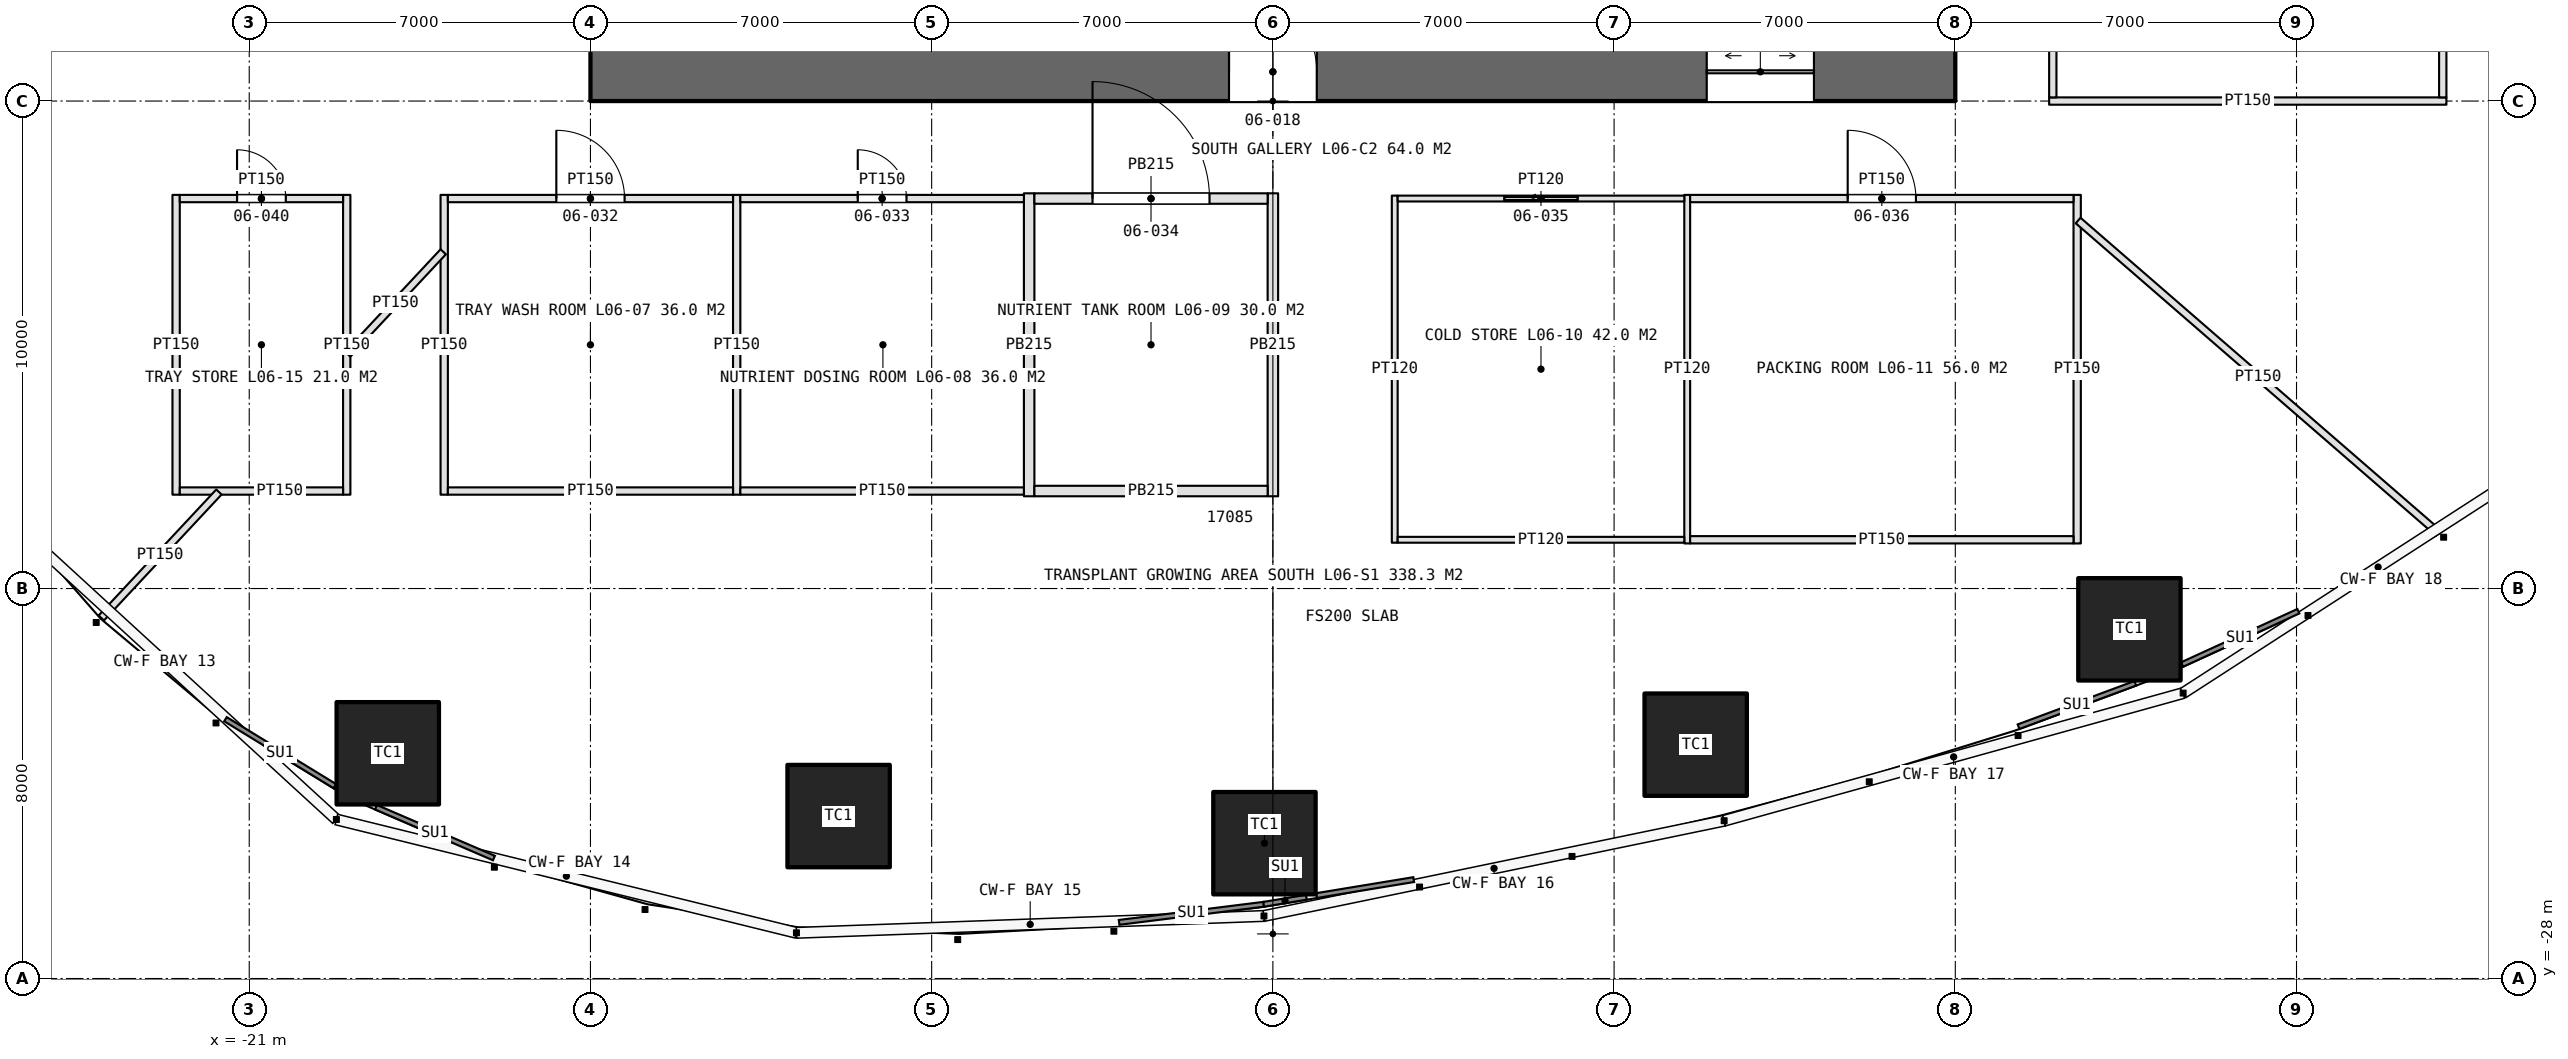
"""IFC4 building model, lengths in metres.
Left out: names, types, materials, properties, quantities, classifications, styles, units other than length and angle.
Written with IfcOpenShell. Run it as: python <this file> out.ifc"""

import sys

from ifc_helpers import new_model, si_unit, direction, frame, frame_2d, origin, origin_2d, place, context, subcontext, project, spatial, rectangle, extrude, element, fill, save


model = new_model("IFC4")
c1 = context("Model", 3, precision=1e-05, world=origin(), true_north=direction((0.0, 1.0)))
c2 = subcontext(c1, "Body", "Model", "MODEL_VIEW")
j1 = project(units=[si_unit("LENGTHUNIT", "METRE"), si_unit("PLANEANGLEUNIT", "RADIAN")], contexts=[c1])
p1 = place(None, origin())
s1 = spatial("IfcSite", under=j1, at=p1, CompositionType="ELEMENT")
p2 = place(p1, origin())
s2 = spatial("IfcBuilding", under=s1, at=p2, CompositionType="ELEMENT")
p3 = place(p2, frame((0.0, 0.0, 30.0)))
s3 = spatial("IfcBuildingStorey", under=s2, at=p3, CompositionType="ELEMENT", Elevation=30.0)
p4 = place(p3, frame((-14.0, -9.4, 0.0), z_axis=(0.0, 0.0, 1.0), x_axis=(1.0, 0.0, 0.0)))
e1 = element("IfcWall", 1, at=p4, inside=s3, PredefinedType="SHEAR", context=c2, shape_type="SweptSolid", body=[
    extrude(rectangle(XDim=28.0, YDim=1.2, at=frame_2d((14.0, 0.0))), origin(), (0.0, 0.0, 1.0), 5.0),
])
p5 = place(p4, frame((13.1, 0.0, 0.0)))
e2 = element("IfcOpeningElement", 2, at=p5, cuts=e1, PredefinedType="OPENING", context=c2, shape_type="SweptSolid", body=[
    extrude(rectangle(XDim=1.8, YDim=2.4, at=frame_2d((0.9, 1.2))), frame((0.0, 0.61, 0.0), z_axis=(0.0, -1.0, 0.0), x_axis=(1.0, 0.0, 0.0)), (0.0, 0.0, 1.0), 1.22),
])
p6 = place(p4, frame((22.9, 0.0, 0.0)))
e3 = element("IfcOpeningElement", 3, at=p6, cuts=e1, PredefinedType="OPENING", context=c2, shape_type="SweptSolid", body=[
    extrude(rectangle(XDim=2.2, YDim=2.7, at=frame_2d((1.1, 1.35))), frame((0.0, 0.61, 0.0), z_axis=(0.0, -1.0, 0.0), x_axis=(1.0, 0.0, 0.0)), (0.0, 0.0, 1.0), 1.22),
])
for number, where, z_axis, x_axis in (
    (4, (-18.158, -23.38, 0.0), (0.0, 0.0, 1.0), (1.0, 0.0, 0.0)),
    (5, (-8.909, -24.668, 0.0), (0.0, 0.0, 1.0), (1.0, 0.0, 0.0)),
    (6, (-0.173, -25.224, 0.0), (0.0, 0.0, 1.0), (1.0, 0.0, 0.0)),
    (7, (8.674, -23.203, 0.0), (0.0, 0.0, 1.0), (1.0, 0.0, 0.0)),
    (8, (17.572, -20.837, 0.0), (0.0, 0.0, 1.0), (1.0, 0.0, 0.0)),
):
    element("IfcColumn", number, at=place(p3, frame(where, z_axis=z_axis, x_axis=x_axis)), inside=s3, PredefinedType="COLUMN", context=c2, shape_type="SweptSolid", body=[
        extrude(rectangle(XDim=2.1, YDim=2.1, at=origin_2d()), origin(), (0.0, 0.0, 1.0), 5.0),
    ])
p7 = place(p3, frame((15.925, -10.0, 0.0), z_axis=(0.0, 0.0, 1.0), x_axis=(1.0, 0.0, 0.0)))
e9 = element("IfcWall", 9, at=p7, inside=s3, PredefinedType="PARTITIONING", context=c2, shape_type="SweptSolid", body=[
    extrude(rectangle(XDim=8.15, YDim=0.15, at=frame_2d((4.075, 0.0))), origin(), (0.0, 0.0, 1.0), 3.6),
])
p8 = place(p3, frame((16.0, -9.925, 0.0), z_axis=(0.0, 0.0, 1.0), x_axis=(0.0, 1.0, 0.0)))
e10 = element("IfcWall", 10, at=p8, inside=s3, PredefinedType="PARTITIONING", context=c2, shape_type="SweptSolid", body=[
    extrude(rectangle(XDim=9.85, YDim=0.15, at=frame_2d((4.925, 0.0))), origin(), (0.0, 0.0, 1.0), 3.6),
])
p9 = place(p8, frame((4.225, 0.0, 0.0)))
e11 = element("IfcOpeningElement", 11, at=p9, cuts=e10, PredefinedType="OPENING", context=c2, shape_type="SweptSolid", body=[
    extrude(rectangle(XDim=1.4, YDim=2.4, at=frame_2d((0.7, 1.2))), frame((0.0, 0.085, 0.0), z_axis=(0.0, -1.0, 0.0), x_axis=(1.0, 0.0, 0.0)), (0.0, 0.0, 1.0), 0.17),
])
p10 = place(p3, frame((24.0, -9.925, 0.0), z_axis=(0.0, 0.0, 1.0), x_axis=(0.0, 1.0, 0.0)))
e12 = element("IfcWall", 12, at=p10, inside=s3, PredefinedType="PARTITIONING", context=c2, shape_type="SweptSolid", body=[
    extrude(rectangle(XDim=9.85, YDim=0.15, at=frame_2d((4.925, 0.0))), origin(), (0.0, 0.0, 1.0), 3.6),
])
for number, where, z_axis, x_axis in (
    (13, (-17.0, -11.925, 0.0), (0.0, 0.0, 1.0), (0.0, -1.0, 0.0)),
    (14, (-11.0, -11.925, 0.0), (0.0, 0.0, 1.0), (0.0, -1.0, 0.0)),
):
    element("IfcWall", number, at=place(p3, frame(where, z_axis=z_axis, x_axis=x_axis)), inside=s3, PredefinedType="PARTITIONING", context=c2, shape_type="SweptSolid", body=[
        extrude(rectangle(XDim=6.15, YDim=0.15, at=frame_2d((3.075, 0.0))), origin(), (0.0, 0.0, 1.0), 3.6),
    ])
for number, where, z_axis, x_axis in (
    (15, (-5.0, -11.893, 0.0), (0.0, 0.0, 1.0), (0.0, -1.0, 0.0)),
    (16, (0.0, -11.893, 0.0), (0.0, 0.0, 1.0), (0.0, -1.0, 0.0)),
):
    element("IfcWall", number, at=place(p3, frame(where, z_axis=z_axis, x_axis=x_axis)), inside=s3, PredefinedType="PARTITIONING", context=c2, shape_type="SweptSolid", body=[
        extrude(rectangle(XDim=6.215, YDim=0.215, at=frame_2d((3.107, 0.0))), origin(), (0.0, 0.0, 1.0), 3.6),
    ])
p11 = place(p3, frame((-16.925, -12.0, 0.0), z_axis=(0.0, 0.0, 1.0), x_axis=(1.0, 0.0, 0.0)))
e17 = element("IfcWall", 17, at=p11, inside=s3, PredefinedType="PARTITIONING", context=c2, shape_type="SweptSolid", body=[
    extrude(rectangle(XDim=5.85, YDim=0.15, at=frame_2d((2.925, 0.0))), origin(), (0.0, 0.0, 1.0), 3.6),
])
p12 = place(p11, frame((2.225, 0.0, 0.0)))
e18 = element("IfcOpeningElement", 18, at=p12, cuts=e17, PredefinedType="OPENING", context=c2, shape_type="SweptSolid", body=[
    extrude(rectangle(XDim=1.4, YDim=2.4, at=frame_2d((0.7, 1.2))), frame((0.0, 0.085, 0.0), z_axis=(0.0, -1.0, 0.0), x_axis=(1.0, 0.0, 0.0)), (0.0, 0.0, 1.0), 0.17),
])
p13 = place(p3, frame((-16.925, -18.0, 0.0), z_axis=(0.0, 0.0, 1.0), x_axis=(1.0, 0.0, 0.0)))
e19 = element("IfcWall", 19, at=p13, inside=s3, PredefinedType="PARTITIONING", context=c2, shape_type="SweptSolid", body=[
    extrude(rectangle(XDim=5.85, YDim=0.15, at=frame_2d((2.925, 0.0))), origin(), (0.0, 0.0, 1.0), 3.6),
])
p14 = place(p3, frame((-10.925, -12.0, 0.0), z_axis=(0.0, 0.0, 1.0), x_axis=(1.0, 0.0, 0.0)))
e20 = element("IfcWall", 20, at=p14, inside=s3, PredefinedType="PARTITIONING", context=c2, shape_type="SweptSolid", body=[
    extrude(rectangle(XDim=5.818, YDim=0.15, at=frame_2d((2.909, 0.0))), origin(), (0.0, 0.0, 1.0), 3.6),
])
p15 = place(p14, frame((2.409, 0.0, 0.0)))
e21 = element("IfcOpeningElement", 21, at=p15, cuts=e20, PredefinedType="OPENING", context=c2, shape_type="SweptSolid", body=[
    extrude(rectangle(XDim=1.0, YDim=2.2, at=frame_2d((0.5, 1.1))), frame((0.0, 0.085, 0.0), z_axis=(0.0, -1.0, 0.0), x_axis=(1.0, 0.0, 0.0)), (0.0, 0.0, 1.0), 0.17),
])
p16 = place(p3, frame((-10.925, -18.0, 0.0), z_axis=(0.0, 0.0, 1.0), x_axis=(1.0, 0.0, 0.0)))
e22 = element("IfcWall", 22, at=p16, inside=s3, PredefinedType="PARTITIONING", context=c2, shape_type="SweptSolid", body=[
    extrude(rectangle(XDim=5.818, YDim=0.15, at=frame_2d((2.909, 0.0))), origin(), (0.0, 0.0, 1.0), 3.6),
])
p17 = place(p3, frame((-4.893, -12.0, 0.0), z_axis=(0.0, 0.0, 1.0), x_axis=(1.0, 0.0, 0.0)))
e23 = element("IfcWall", 23, at=p17, inside=s3, PredefinedType="PARTITIONING", context=c2, shape_type="SweptSolid", body=[
    extrude(rectangle(XDim=4.785, YDim=0.215, at=frame_2d((2.393, 0.0))), origin(), (0.0, 0.0, 1.0), 3.6),
])
p18 = place(p17, frame((1.192, 0.0, 0.0)))
e24 = element("IfcOpeningElement", 24, at=p18, cuts=e23, PredefinedType="OPENING", context=c2, shape_type="SweptSolid", body=[
    extrude(rectangle(XDim=2.4, YDim=2.4, at=frame_2d((1.2, 1.2))), frame((0.0, 0.118, 0.0), z_axis=(0.0, -1.0, 0.0), x_axis=(1.0, 0.0, 0.0)), (0.0, 0.0, 1.0), 0.235),
])
p19 = place(p3, frame((-4.893, -18.0, 0.0), z_axis=(0.0, 0.0, 1.0), x_axis=(1.0, 0.0, 0.0)))
e25 = element("IfcWall", 25, at=p19, inside=s3, PredefinedType="PARTITIONING", context=c2, shape_type="SweptSolid", body=[
    extrude(rectangle(XDim=4.785, YDim=0.215, at=frame_2d((2.393, 0.0))), origin(), (0.0, 0.0, 1.0), 3.6),
])
p20 = place(p3, frame((2.5, -11.94, 0.0), z_axis=(0.0, 0.0, 1.0), x_axis=(0.0, -1.0, 0.0)))
e26 = element("IfcWall", 26, at=p20, inside=s3, PredefinedType="PARTITIONING", context=c2, shape_type="SweptSolid", body=[
    extrude(rectangle(XDim=7.12, YDim=0.12, at=frame_2d((3.56, 0.0))), origin(), (0.0, 0.0, 1.0), 3.6),
])
p21 = place(p3, frame((8.5, -11.925, 0.0), z_axis=(0.0, 0.0, 1.0), x_axis=(0.0, -1.0, 0.0)))
e27 = element("IfcWall", 27, at=p21, inside=s3, PredefinedType="PARTITIONING", context=c2, shape_type="SweptSolid", body=[
    extrude(rectangle(XDim=7.15, YDim=0.12, at=frame_2d((3.575, 0.0))), origin(), (0.0, 0.0, 1.0), 3.6),
])
p22 = place(p3, frame((16.5, -11.925, 0.0), z_axis=(0.0, 0.0, 1.0), x_axis=(0.0, -1.0, 0.0)))
e28 = element("IfcWall", 28, at=p22, inside=s3, PredefinedType="PARTITIONING", context=c2, shape_type="SweptSolid", body=[
    extrude(rectangle(XDim=7.15, YDim=0.15, at=frame_2d((3.575, 0.0))), origin(), (0.0, 0.0, 1.0), 3.6),
])
p23 = place(p3, frame((2.56, -12.0, 0.0), z_axis=(0.0, 0.0, 1.0), x_axis=(1.0, 0.0, 0.0)))
e29 = element("IfcWall", 29, at=p23, inside=s3, PredefinedType="PARTITIONING", context=c2, shape_type="SweptSolid", body=[
    extrude(rectangle(XDim=5.88, YDim=0.12, at=frame_2d((2.94, 0.0))), origin(), (0.0, 0.0, 1.0), 3.6),
])
p24 = place(p23, frame((2.19, 0.0, 0.0)))
e30 = element("IfcOpeningElement", 30, at=p24, cuts=e29, PredefinedType="OPENING", context=c2, shape_type="SweptSolid", body=[
    extrude(rectangle(XDim=1.5, YDim=2.5, at=frame_2d((0.75, 1.25))), frame((0.0, 0.07, 0.0), z_axis=(0.0, -1.0, 0.0), x_axis=(1.0, 0.0, 0.0)), (0.0, 0.0, 1.0), 0.14),
])
p25 = place(p3, frame((2.56, -19.0, 0.0), z_axis=(0.0, 0.0, 1.0), x_axis=(1.0, 0.0, 0.0)))
e31 = element("IfcWall", 31, at=p25, inside=s3, PredefinedType="PARTITIONING", context=c2, shape_type="SweptSolid", body=[
    extrude(rectangle(XDim=5.88, YDim=0.12, at=frame_2d((2.94, 0.0))), origin(), (0.0, 0.0, 1.0), 3.6),
])
p26 = place(p3, frame((8.56, -12.0, 0.0), z_axis=(0.0, 0.0, 1.0), x_axis=(1.0, 0.0, 0.0)))
e32 = element("IfcWall", 32, at=p26, inside=s3, PredefinedType="PARTITIONING", context=c2, shape_type="SweptSolid", body=[
    extrude(rectangle(XDim=7.865, YDim=0.15, at=frame_2d((3.933, 0.0))), origin(), (0.0, 0.0, 1.0), 3.6),
])
p27 = place(p26, frame((3.232, 0.0, 0.0)))
e33 = element("IfcOpeningElement", 33, at=p27, cuts=e32, PredefinedType="OPENING", context=c2, shape_type="SweptSolid", body=[
    extrude(rectangle(XDim=1.4, YDim=2.4, at=frame_2d((0.7, 1.2))), frame((0.0, 0.085, 0.0), z_axis=(0.0, -1.0, 0.0), x_axis=(1.0, 0.0, 0.0)), (0.0, 0.0, 1.0), 0.17),
])
p28 = place(p3, frame((8.56, -19.0, 0.0), z_axis=(0.0, 0.0, 1.0), x_axis=(1.0, 0.0, 0.0)))
e34 = element("IfcWall", 34, at=p28, inside=s3, PredefinedType="PARTITIONING", context=c2, shape_type="SweptSolid", body=[
    extrude(rectangle(XDim=7.865, YDim=0.15, at=frame_2d((3.933, 0.0))), origin(), (0.0, 0.0, 1.0), 3.6),
])
for number, where, z_axis, x_axis in (
    (35, (-22.5, -11.925, 0.0), (0.0, 0.0, 1.0), (0.0, -1.0, 0.0)),
    (36, (-19.0, -11.925, 0.0), (0.0, 0.0, 1.0), (0.0, -1.0, 0.0)),
):
    element("IfcWall", number, at=place(p3, frame(where, z_axis=z_axis, x_axis=x_axis)), inside=s3, PredefinedType="PARTITIONING", context=c2, shape_type="SweptSolid", body=[
        extrude(rectangle(XDim=6.15, YDim=0.15, at=frame_2d((3.075, 0.0))), origin(), (0.0, 0.0, 1.0), 3.6),
    ])
p29 = place(p3, frame((-22.425, -12.0, 0.0), z_axis=(0.0, 0.0, 1.0), x_axis=(1.0, 0.0, 0.0)))
e37 = element("IfcWall", 37, at=p29, inside=s3, PredefinedType="PARTITIONING", context=c2, shape_type="SweptSolid", body=[
    extrude(rectangle(XDim=3.35, YDim=0.15, at=frame_2d((1.675, 0.0))), origin(), (0.0, 0.0, 1.0), 3.6),
])
p30 = place(p29, frame((1.175, 0.0, 0.0)))
e38 = element("IfcOpeningElement", 38, at=p30, cuts=e37, PredefinedType="OPENING", context=c2, shape_type="SweptSolid", body=[
    extrude(rectangle(XDim=1.0, YDim=2.2, at=frame_2d((0.5, 1.1))), frame((0.0, 0.085, 0.0), z_axis=(0.0, -1.0, 0.0), x_axis=(1.0, 0.0, 0.0)), (0.0, 0.0, 1.0), 0.17),
])
p31 = place(p3, frame((-22.425, -18.0, 0.0), z_axis=(0.0, 0.0, 1.0), x_axis=(1.0, 0.0, 0.0)))
e39 = element("IfcWall", 39, at=p31, inside=s3, PredefinedType="PARTITIONING", context=c2, shape_type="SweptSolid", body=[
    extrude(rectangle(XDim=3.35, YDim=0.15, at=frame_2d((1.675, 0.0))), origin(), (0.0, 0.0, 1.0), 3.6),
])
p32 = place(p3, frame((-21.622, -18.02, 0.0), z_axis=(0.0, 0.0, 1.0), x_axis=(-0.682522451791, -0.730864626864, 0.0)))
e40 = element("IfcWall", 40, at=p32, inside=s3, PredefinedType="PARTITIONING", context=c2, shape_type="SweptSolid", body=[
    extrude(rectangle(XDim=3.535, YDim=0.15, at=frame_2d((1.768, 0.0))), origin(), (0.0, 0.0, 1.0), 3.6),
])
p33 = place(p3, frame((-17.02, -13.092, 0.0), z_axis=(0.0, 0.0, 1.0), x_axis=(-0.682506029746, -0.730879962347, 0.0)))
e41 = element("IfcWall", 41, at=p33, inside=s3, PredefinedType="PARTITIONING", context=c2, shape_type="SweptSolid", body=[
    extrude(rectangle(XDim=2.872, YDim=0.15, at=frame_2d((1.436, 0.0))), origin(), (0.0, 0.0, 1.0), 3.6),
])
p34 = place(p3, frame((16.52, -12.451, 0.0), z_axis=(0.0, 0.0, 1.0), x_axis=(0.75543039702, -0.655228902947, 0.0)))
e42 = element("IfcWall", 42, at=p34, inside=s3, PredefinedType="PARTITIONING", context=c2, shape_type="SweptSolid", body=[
    extrude(rectangle(XDim=9.78, YDim=0.15, at=frame_2d((4.89, 0.0))), origin(), (0.0, 0.0, 1.0), 3.6),
])
p35 = place(p5, origin())
e43 = element("IfcDoor", 43, at=p35, inside=s3, OperationType="DOUBLE_DOOR_SINGLE_SWING", PredefinedType="DOOR", context=c2, shape_type="SweptSolid", body=[
    extrude(rectangle(XDim=1.8, YDim=2.4, at=frame_2d((0.9, 1.2))), frame((0.0, 0.025, 0.0), z_axis=(0.0, -1.0, 0.0), x_axis=(1.0, 0.0, 0.0)), (0.0, 0.0, 1.0), 0.05),
])
fill(e2, e43)
p36 = place(p6, origin())
e44 = element("IfcDoor", 44, at=p36, inside=s3, OperationType="DOUBLE_DOOR_SLIDING", PredefinedType="DOOR", context=c2, shape_type="SweptSolid", body=[
    extrude(rectangle(XDim=2.2, YDim=2.7, at=frame_2d((1.1, 1.35))), frame((0.0, 0.025, 0.0), z_axis=(0.0, -1.0, 0.0), x_axis=(1.0, 0.0, 0.0)), (0.0, 0.0, 1.0), 0.05),
])
fill(e3, e44)
p37 = place(p12, origin())
e45 = element("IfcDoor", 45, at=p37, inside=s3, OperationType="DOUBLE_DOOR_DOUBLE_SWING", PredefinedType="DOOR", context=c2, shape_type="SweptSolid", body=[
    extrude(rectangle(XDim=1.4, YDim=2.4, at=frame_2d((0.7, 1.2))), frame((0.0, 0.025, 0.0), z_axis=(0.0, -1.0, 0.0), x_axis=(1.0, 0.0, 0.0)), (0.0, 0.0, 1.0), 0.05),
])
fill(e18, e45)
p38 = place(p15, origin())
e46 = element("IfcDoor", 46, at=p38, inside=s3, OperationType="SINGLE_SWING_LEFT", PredefinedType="DOOR", context=c2, shape_type="SweptSolid", body=[
    extrude(rectangle(XDim=1.0, YDim=2.2, at=frame_2d((0.5, 1.1))), frame((0.0, 0.025, 0.0), z_axis=(0.0, -1.0, 0.0), x_axis=(1.0, 0.0, 0.0)), (0.0, 0.0, 1.0), 0.05),
])
fill(e21, e46)
p39 = place(p18, origin())
e47 = element("IfcDoor", 47, at=p39, inside=s3, OperationType="DOUBLE_DOOR_SINGLE_SWING", PredefinedType="DOOR", context=c2, shape_type="SweptSolid", body=[
    extrude(rectangle(XDim=2.4, YDim=2.4, at=frame_2d((1.2, 1.2))), frame((0.0, 0.025, 0.0), z_axis=(0.0, -1.0, 0.0), x_axis=(1.0, 0.0, 0.0)), (0.0, 0.0, 1.0), 0.05),
])
fill(e24, e47)
p40 = place(p24, origin())
e48 = element("IfcDoor", 48, at=p40, inside=s3, OperationType="SLIDING_TO_LEFT", PredefinedType="DOOR", context=c2, shape_type="SweptSolid", body=[
    extrude(rectangle(XDim=1.5, YDim=2.5, at=frame_2d((0.75, 1.25))), frame((0.0, 0.025, 0.0), z_axis=(0.0, -1.0, 0.0), x_axis=(1.0, 0.0, 0.0)), (0.0, 0.0, 1.0), 0.05),
])
fill(e30, e48)
p41 = place(p27, origin())
e49 = element("IfcDoor", 49, at=p41, inside=s3, OperationType="DOUBLE_DOOR_DOUBLE_SWING", PredefinedType="DOOR", context=c2, shape_type="SweptSolid", body=[
    extrude(rectangle(XDim=1.4, YDim=2.4, at=frame_2d((0.7, 1.2))), frame((0.0, 0.025, 0.0), z_axis=(0.0, -1.0, 0.0), x_axis=(1.0, 0.0, 0.0)), (0.0, 0.0, 1.0), 0.05),
])
fill(e33, e49)
p42 = place(p30, origin())
e50 = element("IfcDoor", 50, at=p42, inside=s3, OperationType="SINGLE_SWING_LEFT", PredefinedType="DOOR", context=c2, shape_type="SweptSolid", body=[
    extrude(rectangle(XDim=1.0, YDim=2.2, at=frame_2d((0.5, 1.1))), frame((0.0, 0.025, 0.0), z_axis=(0.0, -1.0, 0.0), x_axis=(1.0, 0.0, 0.0)), (0.0, 0.0, 1.0), 0.05),
])
fill(e38, e50)
save(model, sys.argv[1])
